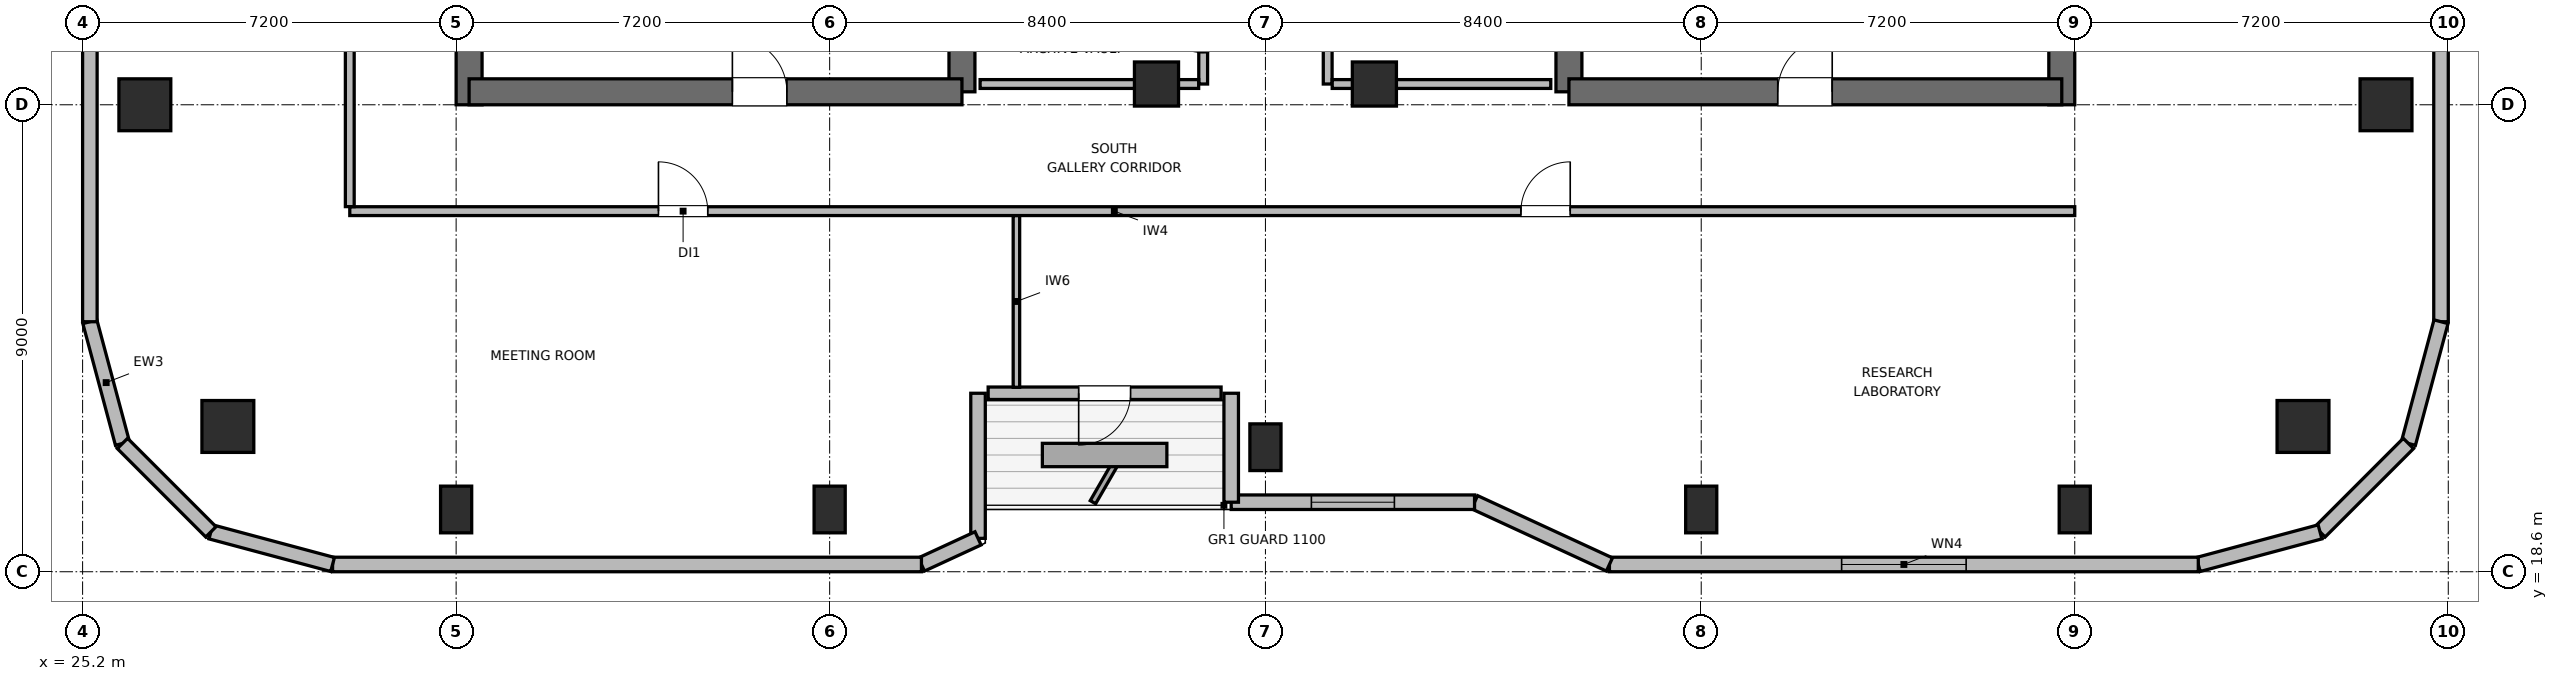
"""IFC4 building model, lengths in metres.
Left out: names, types, materials, properties, quantities, classifications, styles, units other than length and angle.
Written with IfcOpenShell. Run it as: python <this file> out.ifc"""

import sys

from ifc_helpers import new_model, si_unit, direction, frame, frame_2d, origin, origin_2d, place, context, subcontext, project, spatial, rectangle, circle, extrude, element, fill, save


model = new_model("IFC4")
c1 = context("Model", 3, precision=1e-05, world=origin(), true_north=direction((0.0, 1.0)))
c2 = subcontext(c1, "Body", "Model", "MODEL_VIEW")
j1 = project(units=[si_unit("LENGTHUNIT", "METRE"), si_unit("PLANEANGLEUNIT", "RADIAN")], contexts=[c1])
p1 = place(None, origin())
s1 = spatial("IfcSite", under=j1, at=p1, CompositionType="ELEMENT")
p2 = place(p1, origin())
s2 = spatial("IfcBuilding", under=s1, at=p2, CompositionType="ELEMENT")
p3 = place(p2, frame((0.0, 0.0, 278.4)))
s3 = spatial("IfcBuildingStorey", under=s2, at=p3, CompositionType="ELEMENT", Elevation=278.4)
p4 = place(p3, frame((32.65, 27.6, 0.0), z_axis=(0.0, 0.0, 1.0), x_axis=(0.0, 1.0, 0.0)))
e1 = element("IfcWall", 1, at=p4, inside=s3, PredefinedType="SHEAR", context=c2, shape_type="SweptSolid", body=[
    extrude(rectangle(XDim=16.8, YDim=0.5, at=frame_2d((8.4, 0.0))), origin(), (0.0, 0.0, 1.0), 3.9),
])
p5 = place(p3, frame((42.15, 27.85, 0.0), z_axis=(0.0, 0.0, 1.0), x_axis=(0.0, 1.0, 0.0)))
e2 = element("IfcWall", 2, at=p5, inside=s3, PredefinedType="SHEAR", context=c2, shape_type="SweptSolid", body=[
    extrude(rectangle(XDim=6.55, YDim=0.5, at=frame_2d((3.275, 0.0))), origin(), (0.0, 0.0, 1.0), 3.9),
])
p6 = place(p3, frame((32.65, 27.85, 0.0), z_axis=(0.0, 0.0, 1.0), x_axis=(1.0, 0.0, 0.0)))
e3 = element("IfcWall", 3, at=p6, inside=s3, PredefinedType="SHEAR", context=c2, shape_type="SweptSolid", body=[
    extrude(rectangle(XDim=9.5, YDim=0.5, at=frame_2d((4.75, 0.0))), origin(), (0.0, 0.0, 1.0), 3.9),
])
p7 = place(p6, frame((5.075, 0.0, 0.0)))
e4 = element("IfcOpeningElement", 4, at=p7, cuts=e3, PredefinedType="OPENING", context=c2, shape_type="SweptSolid", body=[
    extrude(rectangle(XDim=1.05, YDim=2.04, at=frame_2d((0.525, 1.02))), frame((0.0, 0.26, 0.0), z_axis=(0.0, -1.0, 0.0), x_axis=(1.0, 0.0, 0.0)), (0.0, 0.0, 1.0), 0.52),
])
p8 = place(p3, frame((53.85, 27.85, 0.0), z_axis=(0.0, 0.0, 1.0), x_axis=(0.0, 1.0, 0.0)))
e5 = element("IfcWall", 5, at=p8, inside=s3, PredefinedType="SHEAR", context=c2, shape_type="SweptSolid", body=[
    extrude(rectangle(XDim=7.95, YDim=0.5, at=frame_2d((3.975, 0.0))), origin(), (0.0, 0.0, 1.0), 3.9),
])
p9 = place(p3, frame((63.35, 27.6, 0.0), z_axis=(0.0, 0.0, 1.0), x_axis=(0.0, 1.0, 0.0)))
e6 = element("IfcWall", 6, at=p9, inside=s3, PredefinedType="SHEAR", context=c2, shape_type="SweptSolid", body=[
    extrude(rectangle(XDim=16.8, YDim=0.5, at=frame_2d((8.4, 0.0))), origin(), (0.0, 0.0, 1.0), 3.9),
])
p10 = place(p3, frame((53.85, 27.85, 0.0), z_axis=(0.0, 0.0, 1.0), x_axis=(1.0, 0.0, 0.0)))
e7 = element("IfcWall", 7, at=p10, inside=s3, PredefinedType="SHEAR", context=c2, shape_type="SweptSolid", body=[
    extrude(rectangle(XDim=9.5, YDim=0.5, at=frame_2d((4.75, 0.0))), origin(), (0.0, 0.0, 1.0), 3.9),
])
p11 = place(p10, frame((4.025, 0.0, 0.0)))
e8 = element("IfcOpeningElement", 8, at=p11, cuts=e7, PredefinedType="OPENING", context=c2, shape_type="SweptSolid", body=[
    extrude(rectangle(XDim=1.05, YDim=2.04, at=frame_2d((0.525, 1.02))), frame((0.0, 0.26, 0.0), z_axis=(0.0, -1.0, 0.0), x_axis=(1.0, 0.0, 0.0)), (0.0, 0.0, 1.0), 0.52),
])
for number, where, z_axis, x_axis in (
    (9, (28.0, 21.4, 0.0), (0.0, 0.0, 1.0), (1.0, 0.0, 0.0)),
    (10, (68.0, 21.4, 0.0), (0.0, 0.0, 1.0), (1.0, 0.0, 0.0)),
):
    element("IfcColumn", number, at=place(p3, frame(where, z_axis=z_axis, x_axis=x_axis)), inside=s3, PredefinedType="COLUMN", context=c2, shape_type="SweptSolid", body=[
        extrude(circle(Radius=0.5, at=origin_2d()), origin(), (0.0, 0.0, 1.0), 3.9),
    ])
for number, where, z_axis, x_axis in (
    (11, (32.4, 19.8, 0.0), (0.0, 0.0, 1.0), (1.0, 0.0, 0.0)),
    (12, (39.6, 19.8, 0.0), (0.0, 0.0, 1.0), (1.0, 0.0, 0.0)),
    (13, (48.0, 21.0, 0.0), (0.0, 0.0, 1.0), (1.0, 0.0, 0.0)),
    (14, (56.4, 19.8, 0.0), (0.0, 0.0, 1.0), (1.0, 0.0, 0.0)),
    (15, (63.6, 19.8, 0.0), (0.0, 0.0, 1.0), (1.0, 0.0, 0.0)),
):
    element("IfcColumn", number, at=place(p3, frame(where, z_axis=z_axis, x_axis=x_axis)), inside=s3, PredefinedType="COLUMN", context=c2, shape_type="SweptSolid", body=[
        extrude(rectangle(XDim=0.6, YDim=0.9, at=origin_2d()), origin(), (0.0, 0.0, 1.0), 3.9),
    ])
for number, where, z_axis, x_axis in (
    (16, (26.4, 27.6, 0.0), (0.0, 0.0, 1.0), (1.0, 0.0, 0.0)),
    (17, (69.6, 27.6, 0.0), (0.0, 0.0, 1.0), (1.0, 0.0, 0.0)),
):
    element("IfcColumn", number, at=place(p3, frame(where, z_axis=z_axis, x_axis=x_axis)), inside=s3, PredefinedType="COLUMN", context=c2, shape_type="SweptSolid", body=[
        extrude(rectangle(XDim=1.0, YDim=1.0, at=origin_2d()), origin(), (0.0, 0.0, 1.0), 3.9),
    ])
for number, where, z_axis, x_axis in (
    (18, (45.9, 28.0, 0.0), (0.0, 0.0, 1.0), (1.0, 0.0, 0.0)),
    (19, (50.1, 28.0, 0.0), (0.0, 0.0, 1.0), (1.0, 0.0, 0.0)),
):
    element("IfcColumn", number, at=place(p3, frame(where, z_axis=z_axis, x_axis=x_axis)), inside=s3, PredefinedType="COLUMN", context=c2, shape_type="SweptSolid", body=[
        extrude(rectangle(XDim=0.85, YDim=0.85, at=origin_2d()), origin(), (0.0, 0.0, 1.0), 3.9),
    ])
p12 = place(p3, frame((25.969, 21.073, 0.0), z_axis=(0.0, 0.0, 1.0), x_axis=(-0.258751159445, 0.965944013639, 0.0)))
e20 = element("IfcWall", 20, at=p12, inside=s3, PredefinedType="SOLIDWALL", context=c2, shape_type="SweptSolid", body=[
    extrude(rectangle(XDim=2.429, YDim=0.28, at=frame_2d((1.214, 0.0))), origin(), (0.0, 0.0, 1.0), 3.6),
])
p13 = place(p3, frame((25.34, 23.418, 0.0), z_axis=(0.0, 0.0, 1.0), x_axis=(0.0, 1.0, 0.0)))
e21 = element("IfcWall", 21, at=p13, inside=s3, PredefinedType="SOLIDWALL", context=c2, shape_type="SweptSolid", body=[
    extrude(rectangle(XDim=5.842, YDim=0.28, at=frame_2d((2.921, 0.0))), origin(), (0.0, 0.0, 1.0), 3.6),
])
p14 = place(p3, frame((70.66, 37.66, 0.0), z_axis=(0.0, 0.0, 1.0), x_axis=(0.0, -1.0, 0.0)))
e22 = element("IfcWall", 22, at=p14, inside=s3, PredefinedType="SOLIDWALL", context=c2, shape_type="SweptSolid", body=[
    extrude(rectangle(XDim=14.241, YDim=0.28, at=frame_2d((7.121, 0.0))), origin(), (0.0, 0.0, 1.0), 3.6),
])
p15 = place(p14, frame((6.321, 0.0, 0.85)))
e23 = element("IfcOpeningElement", 23, at=p15, cuts=e22, PredefinedType="OPENING", context=c2, shape_type="SweptSolid", body=[
    extrude(rectangle(XDim=1.6, YDim=1.0, at=frame_2d((0.8, 0.5))), frame((0.0, 0.15, 0.0), z_axis=(0.0, -1.0, 0.0), x_axis=(1.0, 0.0, 0.0)), (0.0, 0.0, 1.0), 0.3),
])
p16 = place(p3, frame((70.66, 23.418, 0.0), z_axis=(0.0, 0.0, 1.0), x_axis=(-0.258751159445, -0.965944013639, 0.0)))
e24 = element("IfcWall", 24, at=p16, inside=s3, PredefinedType="SOLIDWALL", context=c2, shape_type="SweptSolid", body=[
    extrude(rectangle(XDim=2.429, YDim=0.28, at=frame_2d((1.214, 0.0))), origin(), (0.0, 0.0, 1.0), 3.6),
])
p17 = place(p3, frame((70.031, 21.073, 0.0), z_axis=(0.0, 0.0, 1.0), x_axis=(-0.707106781187, -0.707106781187, 0.0)))
e25 = element("IfcWall", 25, at=p17, inside=s3, PredefinedType="SOLIDWALL", context=c2, shape_type="SweptSolid", body=[
    extrude(rectangle(XDim=2.41, YDim=0.28, at=frame_2d((1.205, 0.0))), origin(), (0.0, 0.0, 1.0), 3.6),
])
p18 = place(p3, frame((68.327, 19.368, 0.0), z_axis=(0.0, 0.0, 1.0), x_axis=(-0.965937282298, -0.25877628691, 0.0)))
e26 = element("IfcWall", 26, at=p18, inside=s3, PredefinedType="SOLIDWALL", context=c2, shape_type="SweptSolid", body=[
    extrude(rectangle(XDim=2.428, YDim=0.28, at=frame_2d((1.214, 0.0))), origin(), (0.0, 0.0, 1.0), 3.6),
])
p19 = place(p3, frame((65.982, 18.74, 0.0), z_axis=(0.0, 0.0, 1.0), x_axis=(-1.0, 0.0, 0.0)))
e27 = element("IfcWall", 27, at=p19, inside=s3, PredefinedType="SOLIDWALL", context=c2, shape_type="SweptSolid", body=[
    extrude(rectangle(XDim=11.351, YDim=0.28, at=frame_2d((5.676, 0.0))), origin(), (0.0, 0.0, 1.0), 3.6),
])
p20 = place(p19, frame((4.475, 0.0, 0.85)))
e28 = element("IfcOpeningElement", 28, at=p20, cuts=e27, PredefinedType="OPENING", context=c2, shape_type="SweptSolid", body=[
    extrude(rectangle(XDim=2.4, YDim=1.15, at=frame_2d((1.2, 0.575))), frame((0.0, 0.15, 0.0), z_axis=(0.0, -1.0, 0.0), x_axis=(1.0, 0.0, 0.0)), (0.0, 0.0, 1.0), 0.3),
])
p21 = place(p3, frame((54.631, 18.74, 0.0), z_axis=(0.0, 0.0, 1.0), x_axis=(-0.907956889006, 0.419063584324, 0.0)))
e29 = element("IfcWall", 29, at=p21, inside=s3, PredefinedType="SOLIDWALL", context=c2, shape_type="SweptSolid", body=[
    extrude(rectangle(XDim=2.864, YDim=0.28, at=frame_2d((1.432, 0.0))), origin(), (0.0, 0.0, 1.0), 2.185),
])
p22 = place(p3, frame((52.031, 19.94, 0.0), z_axis=(0.0, 0.0, 1.0), x_axis=(-1.0, 0.0, 0.0)))
e30 = element("IfcWall", 30, at=p22, inside=s3, PredefinedType="SOLIDWALL", context=c2, shape_type="SweptSolid", body=[
    extrude(rectangle(XDim=4.691, YDim=0.28, at=frame_2d((2.345, 0.0))), origin(), (0.0, 0.0, 1.0), 2.185),
])
p23 = place(p22, frame((1.545, 0.0, 0.85)))
e31 = element("IfcOpeningElement", 31, at=p23, cuts=e30, PredefinedType="OPENING", context=c2, shape_type="SweptSolid", body=[
    extrude(rectangle(XDim=1.6, YDim=1.0, at=frame_2d((0.8, 0.5))), frame((0.0, 0.15, 0.0), z_axis=(0.0, -1.0, 0.0), x_axis=(1.0, 0.0, 0.0)), (0.0, 0.0, 1.0), 0.3),
])
p24 = place(p3, frame((47.34, 19.94, 0.0), z_axis=(0.0, 0.0, 1.0), x_axis=(0.0, 1.0, 0.0)))
e32 = element("IfcWall", 32, at=p24, inside=s3, PredefinedType="SOLIDWALL", context=c2, shape_type="SweptSolid", body=[
    extrude(rectangle(XDim=2.1, YDim=0.28, at=frame_2d((1.05, 0.0))), origin(), (0.0, 0.0, 1.0), 2.185),
])
p25 = place(p3, frame((47.145, 22.04, 0.0), z_axis=(0.0, 0.0, 1.0), x_axis=(-1.0, 0.0, 0.0)))
e33 = element("IfcWall", 33, at=p25, inside=s3, PredefinedType="SOLIDWALL", context=c2, shape_type="SweptSolid", body=[
    extrude(rectangle(XDim=4.49, YDim=0.24, at=frame_2d((2.245, 0.0))), origin(), (0.0, 0.0, 1.0), 3.6),
])
p26 = place(p25, frame((1.745, 0.0, 0.0)))
e34 = element("IfcOpeningElement", 34, at=p26, cuts=e33, PredefinedType="OPENING", context=c2, shape_type="SweptSolid", body=[
    extrude(rectangle(XDim=1.0, YDim=2.02, at=frame_2d((0.5, 1.01))), frame((0.0, 0.13, 0.0), z_axis=(0.0, -1.0, 0.0), x_axis=(1.0, 0.0, 0.0)), (0.0, 0.0, 1.0), 0.26),
])
p27 = place(p3, frame((42.46, 22.04, 0.0), z_axis=(0.0, 0.0, 1.0), x_axis=(0.0, -1.0, 0.0)))
e35 = element("IfcWall", 35, at=p27, inside=s3, PredefinedType="SOLIDWALL", context=c2, shape_type="SweptSolid", body=[
    extrude(rectangle(XDim=2.796, YDim=0.28, at=frame_2d((1.398, 0.0))), origin(), (0.0, 0.0, 1.0), 2.185),
])
p28 = place(p3, frame((42.46, 19.244, 0.0), z_axis=(0.0, 0.0, 1.0), x_axis=(-0.907893953211, -0.419199916176, 0.0)))
e36 = element("IfcWall", 36, at=p28, inside=s3, PredefinedType="SOLIDWALL", context=c2, shape_type="SweptSolid", body=[
    extrude(rectangle(XDim=1.201, YDim=0.28, at=frame_2d((0.601, 0.0))), origin(), (0.0, 0.0, 1.0), 3.6),
])
p29 = place(p3, frame((41.369, 18.74, 0.0), z_axis=(0.0, 0.0, 1.0), x_axis=(-1.0, 0.0, 0.0)))
e37 = element("IfcWall", 37, at=p29, inside=s3, PredefinedType="SOLIDWALL", context=c2, shape_type="SweptSolid", body=[
    extrude(rectangle(XDim=11.351, YDim=0.28, at=frame_2d((5.675, 0.0))), origin(), (0.0, 0.0, 1.0), 3.6),
])
p30 = place(p3, frame((30.018, 18.74, 0.0), z_axis=(0.0, 0.0, 1.0), x_axis=(-0.965937282298, 0.25877628691, 0.0)))
e38 = element("IfcWall", 38, at=p30, inside=s3, PredefinedType="SOLIDWALL", context=c2, shape_type="SweptSolid", body=[
    extrude(rectangle(XDim=2.428, YDim=0.28, at=frame_2d((1.214, 0.0))), origin(), (0.0, 0.0, 1.0), 3.6),
])
p31 = place(p3, frame((27.673, 19.368, 0.0), z_axis=(0.0, 0.0, 1.0), x_axis=(-0.707106781187, 0.707106781187, 0.0)))
e39 = element("IfcWall", 39, at=p31, inside=s3, PredefinedType="SOLIDWALL", context=c2, shape_type="SweptSolid", body=[
    extrude(rectangle(XDim=2.41, YDim=0.28, at=frame_2d((1.205, 0.0))), origin(), (0.0, 0.0, 1.0), 3.6),
])
p32 = place(p3, frame((46.8, 28.0, 0.0), z_axis=(0.0, 0.0, 1.0), x_axis=(0.0, 1.0, 0.0)))
e40 = element("IfcWall", 40, at=p32, inside=s3, PredefinedType="PARTITIONING", context=c2, shape_type="SweptSolid", body=[
    extrude(rectangle(XDim=4.5, YDim=0.17, at=frame_2d((2.25, 0.0))), origin(), (0.0, 0.0, 1.0), 3.6),
])
p33 = place(p32, frame((0.605, 0.0, 0.0)))
e41 = element("IfcOpeningElement", 41, at=p33, cuts=e40, PredefinedType="OPENING", context=c2, shape_type="SweptSolid", body=[
    extrude(rectangle(XDim=0.9, YDim=2.02, at=frame_2d((0.45, 1.01))), frame((0.0, 0.095, 0.0), z_axis=(0.0, -1.0, 0.0), x_axis=(1.0, 0.0, 0.0)), (0.0, 0.0, 1.0), 0.19),
])
p34 = place(p32, frame((2.655, 0.0, 0.0)))
e42 = element("IfcOpeningElement", 42, at=p34, cuts=e40, PredefinedType="OPENING", context=c2, shape_type="SweptSolid", body=[
    extrude(rectangle(XDim=0.9, YDim=2.02, at=frame_2d((0.45, 1.01))), frame((0.0, 0.095, 0.0), z_axis=(0.0, -1.0, 0.0), x_axis=(1.0, 0.0, 0.0)), (0.0, 0.0, 1.0), 0.19),
])
p35 = place(p3, frame((42.5, 28.0, 0.0), z_axis=(0.0, 0.0, 1.0), x_axis=(1.0, 0.0, 0.0)))
e43 = element("IfcWall", 43, at=p35, inside=s3, PredefinedType="PARTITIONING", context=c2, shape_type="SweptSolid", body=[
    extrude(rectangle(XDim=4.213, YDim=0.17, at=frame_2d((2.106, 0.0))), origin(), (0.0, 0.0, 1.0), 2.685),
])
p36 = place(p3, frame((49.2, 28.0, 0.0), z_axis=(0.0, 0.0, 1.0), x_axis=(0.0, 1.0, 0.0)))
e44 = element("IfcWall", 44, at=p36, inside=s3, PredefinedType="PARTITIONING", context=c2, shape_type="SweptSolid", body=[
    extrude(rectangle(XDim=4.5, YDim=0.17, at=frame_2d((2.25, 0.0))), origin(), (0.0, 0.0, 1.0), 3.6),
])
p37 = place(p36, frame((0.99, 0.0, 0.0)))
e45 = element("IfcOpeningElement", 45, at=p37, cuts=e44, PredefinedType="OPENING", context=c2, shape_type="SweptSolid", body=[
    extrude(rectangle(XDim=0.9, YDim=2.02, at=frame_2d((0.45, 1.01))), frame((0.0, 0.095, 0.0), z_axis=(0.0, -1.0, 0.0), x_axis=(1.0, 0.0, 0.0)), (0.0, 0.0, 1.0), 0.19),
])
p38 = place(p36, frame((3.24, 0.0, 0.0)))
e46 = element("IfcOpeningElement", 46, at=p38, cuts=e44, PredefinedType="OPENING", context=c2, shape_type="SweptSolid", body=[
    extrude(rectangle(XDim=0.9, YDim=2.02, at=frame_2d((0.45, 1.01))), frame((0.0, 0.095, 0.0), z_axis=(0.0, -1.0, 0.0), x_axis=(1.0, 0.0, 0.0)), (0.0, 0.0, 1.0), 0.19),
])
p39 = place(p3, frame((49.287, 28.0, 0.0), z_axis=(0.0, 0.0, 1.0), x_axis=(1.0, 0.0, 0.0)))
e47 = element("IfcWall", 47, at=p39, inside=s3, PredefinedType="PARTITIONING", context=c2, shape_type="SweptSolid", body=[
    extrude(rectangle(XDim=4.213, YDim=0.17, at=frame_2d((2.106, 0.0))), origin(), (0.0, 0.0, 1.0), 2.685),
])
p40 = place(p3, frame((30.35, 25.55, 0.0), z_axis=(0.0, 0.0, 1.0), x_axis=(1.0, 0.0, 0.0)))
e48 = element("IfcWall", 48, at=p40, inside=s3, PredefinedType="PARTITIONING", context=c2, shape_type="SweptSolid", body=[
    extrude(rectangle(XDim=33.25, YDim=0.17, at=frame_2d((16.625, 0.0))), origin(), (0.0, 0.0, 1.0), 3.6),
])
p41 = place(p40, frame((5.95, 0.0, 0.0)))
e49 = element("IfcOpeningElement", 49, at=p41, cuts=e48, PredefinedType="OPENING", context=c2, shape_type="SweptSolid", body=[
    extrude(rectangle(XDim=0.95, YDim=2.04, at=frame_2d((0.475, 1.02))), frame((0.0, 0.095, 0.0), z_axis=(0.0, -1.0, 0.0), x_axis=(1.0, 0.0, 0.0)), (0.0, 0.0, 1.0), 0.19),
])
p42 = place(p40, frame((22.575, 0.0, 0.0)))
e50 = element("IfcOpeningElement", 50, at=p42, cuts=e48, PredefinedType="OPENING", context=c2, shape_type="SweptSolid", body=[
    extrude(rectangle(XDim=0.95, YDim=2.04, at=frame_2d((0.475, 1.02))), frame((0.0, 0.095, 0.0), z_axis=(0.0, -1.0, 0.0), x_axis=(1.0, 0.0, 0.0)), (0.0, 0.0, 1.0), 0.19),
])
p43 = place(p3, frame((30.35, 25.637, 0.0), z_axis=(0.0, 0.0, 1.0), x_axis=(0.0, 1.0, 0.0)))
e51 = element("IfcWall", 51, at=p43, inside=s3, PredefinedType="PARTITIONING", context=c2, shape_type="SweptSolid", body=[
    extrude(rectangle(XDim=20.726, YDim=0.17, at=frame_2d((10.363, 0.0))), origin(), (0.0, 0.0, 1.0), 3.6),
])
p44 = place(p43, frame((9.888, 0.0, 0.0)))
e52 = element("IfcOpeningElement", 52, at=p44, cuts=e51, PredefinedType="OPENING", context=c2, shape_type="SweptSolid", body=[
    extrude(rectangle(XDim=0.95, YDim=2.04, at=frame_2d((0.475, 1.02))), frame((0.0, 0.095, 0.0), z_axis=(0.0, -1.0, 0.0), x_axis=(1.0, 0.0, 0.0)), (0.0, 0.0, 1.0), 0.19),
])
p45 = place(p3, frame((43.2, 22.155, 0.0), z_axis=(0.0, 0.0, 1.0), x_axis=(0.0, 1.0, 0.0)))
e53 = element("IfcWall", 53, at=p45, inside=s3, PredefinedType="PARTITIONING", context=c2, shape_type="SweptSolid", body=[
    extrude(rectangle(XDim=3.308, YDim=0.125, at=frame_2d((1.654, 0.0))), origin(), (0.0, 0.0, 1.0), 2.963),
])
p46 = place(p20, origin())
e54 = element("IfcWindow", 54, at=p46, inside=s3, PartitioningType="SINGLE_PANEL", PredefinedType="WINDOW", context=c2, shape_type="SweptSolid", body=[
    extrude(rectangle(XDim=2.4, YDim=1.15, at=frame_2d((1.2, 0.575))), frame((0.0, 0.03, 0.0), z_axis=(0.0, -1.0, 0.0), x_axis=(1.0, 0.0, 0.0)), (0.0, 0.0, 1.0), 0.06),
])
fill(e28, e54)
p47 = place(p23, origin())
e55 = element("IfcWindow", 55, at=p47, inside=s3, PartitioningType="SINGLE_PANEL", PredefinedType="WINDOW", context=c2, shape_type="SweptSolid", body=[
    extrude(rectangle(XDim=1.6, YDim=1.0, at=frame_2d((0.8, 0.5))), frame((0.0, 0.03, 0.0), z_axis=(0.0, -1.0, 0.0), x_axis=(1.0, 0.0, 0.0)), (0.0, 0.0, 1.0), 0.06),
])
fill(e31, e55)
p48 = place(p26, origin())
e56 = element("IfcDoor", 56, at=p48, inside=s3, OperationType="SINGLE_SWING_RIGHT", PredefinedType="DOOR", context=c2, shape_type="SweptSolid", body=[
    extrude(rectangle(XDim=1.0, YDim=2.02, at=frame_2d((0.5, 1.01))), frame((0.0, 0.025, 0.0), z_axis=(0.0, -1.0, 0.0), x_axis=(1.0, 0.0, 0.0)), (0.0, 0.0, 1.0), 0.05),
])
fill(e34, e56)
p49 = place(p7, origin())
e57 = element("IfcDoor", 57, at=p49, inside=s3, OperationType="SINGLE_SWING_LEFT", PredefinedType="DOOR", context=c2, shape_type="SweptSolid", body=[
    extrude(rectangle(XDim=1.05, YDim=2.04, at=frame_2d((0.525, 1.02))), frame((0.0, 0.025, 0.0), z_axis=(0.0, -1.0, 0.0), x_axis=(1.0, 0.0, 0.0)), (0.0, 0.0, 1.0), 0.05),
])
fill(e4, e57)
p50 = place(p11, origin())
e58 = element("IfcDoor", 58, at=p50, inside=s3, OperationType="SINGLE_SWING_RIGHT", PredefinedType="DOOR", context=c2, shape_type="SweptSolid", body=[
    extrude(rectangle(XDim=1.05, YDim=2.04, at=frame_2d((0.525, 1.02))), frame((0.0, 0.025, 0.0), z_axis=(0.0, -1.0, 0.0), x_axis=(1.0, 0.0, 0.0)), (0.0, 0.0, 1.0), 0.05),
])
fill(e8, e58)
p51 = place(p41, origin())
e59 = element("IfcDoor", 59, at=p51, inside=s3, OperationType="SINGLE_SWING_LEFT", PredefinedType="DOOR", context=c2, shape_type="SweptSolid", body=[
    extrude(rectangle(XDim=0.95, YDim=2.04, at=frame_2d((0.475, 1.02))), frame((0.0, 0.025, 0.0), z_axis=(0.0, -1.0, 0.0), x_axis=(1.0, 0.0, 0.0)), (0.0, 0.0, 1.0), 0.05),
])
fill(e49, e59)
p52 = place(p42, origin())
e60 = element("IfcDoor", 60, at=p52, inside=s3, OperationType="SINGLE_SWING_RIGHT", PredefinedType="DOOR", context=c2, shape_type="SweptSolid", body=[
    extrude(rectangle(XDim=0.95, YDim=2.04, at=frame_2d((0.475, 1.02))), frame((0.0, 0.025, 0.0), z_axis=(0.0, -1.0, 0.0), x_axis=(1.0, 0.0, 0.0)), (0.0, 0.0, 1.0), 0.05),
])
fill(e50, e60)
save(model, sys.argv[1])
